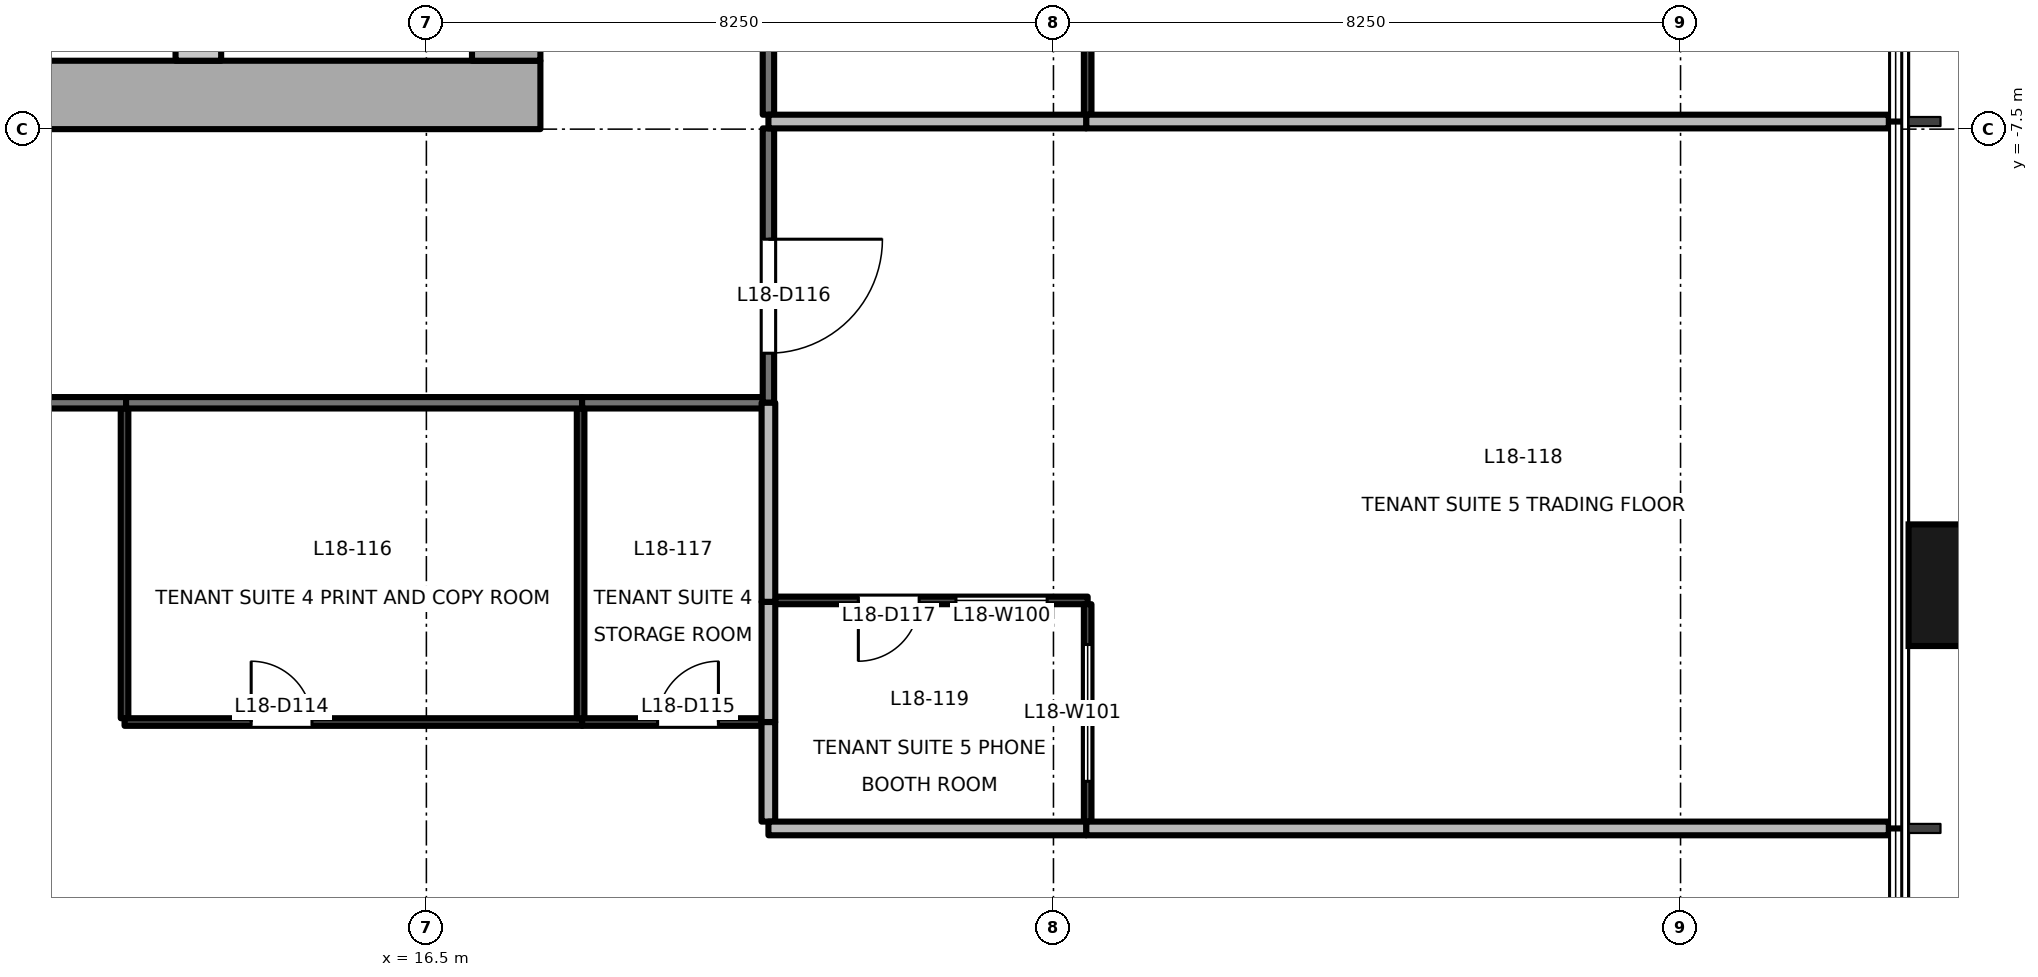
"""IFC4 building model, lengths in metres.
Left out: names, types, materials, properties, quantities, classifications, styles, units other than length and angle.
Written with IfcOpenShell. Run it as: python <this file> out.ifc"""

import sys

from ifc_helpers import new_model, si_unit, direction, frame, frame_2d, origin, origin_2d, place, context, subcontext, project, spatial, rectangle, extrude, element, fill, save


model = new_model("IFC4")
c1 = context("Model", 3, precision=1e-05, world=origin(), true_north=direction((0.0, 1.0)))
c2 = subcontext(c1, "Body", "Model", "MODEL_VIEW")
j1 = project(units=[si_unit("LENGTHUNIT", "METRE"), si_unit("PLANEANGLEUNIT", "RADIAN")], contexts=[c1])
p1 = place(None, origin())
s1 = spatial("IfcSite", under=j1, at=p1, CompositionType="ELEMENT")
p2 = place(p1, origin())
s2 = spatial("IfcBuilding", under=s1, at=p2, CompositionType="ELEMENT")
p3 = place(p2, frame((0.0, 0.0, 83.7)))
s3 = spatial("IfcBuildingStorey", under=s2, at=p3, CompositionType="ELEMENT", Elevation=83.7)
p4 = place(p3, frame((36.9, -13.5, -0.2), z_axis=(0.0, 0.0, 1.0), x_axis=(0.0, 1.0, 0.0)))
e1 = element("IfcColumn", 1, at=p4, inside=s3, PredefinedType="COLUMN", context=c2, shape_type="SweptSolid", body=[
    extrude(rectangle(XDim=1.6, YDim=1.8, at=origin_2d()), origin(), (0.0, 0.0, 1.0), 4.0),
])
p5 = place(p3, frame((-18.0, -7.05, -0.2), z_axis=(0.0, 0.0, 1.0), x_axis=(1.0, 0.0, 0.0)))
e2 = element("IfcWall", 2, at=p5, inside=s3, PredefinedType="SHEAR", context=c2, shape_type="SweptSolid", body=[
    extrude(rectangle(XDim=36.0, YDim=0.9, at=frame_2d((18.0, 0.0))), origin(), (0.0, 0.0, 1.0), 4.0),
])
p6 = place(p5, frame((7.8, 0.0, 0.2)))
e3 = element("IfcOpeningElement", 3, at=p6, cuts=e2, PredefinedType="OPENING", context=c2, shape_type="SweptSolid", body=[
    extrude(rectangle(XDim=2.4, YDim=2.1, at=frame_2d((1.2, 1.05))), frame((0.0, 0.46, 0.0), z_axis=(0.0, -1.0, 0.0), x_axis=(1.0, 0.0, 0.0)), (0.0, 0.0, 1.0), 0.921),
])
p7 = place(p5, frame((17.4, 0.0, 0.2)))
e4 = element("IfcOpeningElement", 4, at=p7, cuts=e2, PredefinedType="OPENING", context=c2, shape_type="SweptSolid", body=[
    extrude(rectangle(XDim=1.2, YDim=2.1, at=frame_2d((0.6, 1.05))), frame((0.0, 0.46, 0.0), z_axis=(0.0, -1.0, 0.0), x_axis=(1.0, 0.0, 0.0)), (0.0, 0.0, 1.0), 0.921),
])
p8 = place(p5, frame((26.1, 0.0, 0.2)))
e5 = element("IfcOpeningElement", 5, at=p8, cuts=e2, PredefinedType="OPENING", context=c2, shape_type="SweptSolid", body=[
    extrude(rectangle(XDim=2.4, YDim=2.1, at=frame_2d((1.2, 1.05))), frame((0.0, 0.46, 0.0), z_axis=(0.0, -1.0, 0.0), x_axis=(1.0, 0.0, 0.0)), (0.0, 0.0, 1.0), 0.921),
])
p9 = place(p3, frame((17.55, -6.6, -0.2), z_axis=(0.0, 0.0, 1.0), x_axis=(0.0, 1.0, 0.0)))
e6 = element("IfcWall", 6, at=p9, inside=s3, PredefinedType="SHEAR", context=c2, shape_type="SweptSolid", body=[
    extrude(rectangle(XDim=13.2, YDim=0.9, at=frame_2d((6.6, 0.0))), origin(), (0.0, 0.0, 1.0), 4.0),
])
p10 = place(p9, frame((4.55, 0.0, 0.2)))
e7 = element("IfcOpeningElement", 7, at=p10, cuts=e6, PredefinedType="OPENING", context=c2, shape_type="SweptSolid", body=[
    extrude(rectangle(XDim=1.2, YDim=2.1, at=frame_2d((0.6, 1.05))), frame((0.0, 0.46, 0.0), z_axis=(0.0, -1.0, 0.0), x_axis=(1.0, 0.0, 0.0)), (0.0, 0.0, 1.0), 0.921),
])
p11 = place(p3, frame((13.5, -6.6, -0.2), z_axis=(0.0, 0.0, 1.0), x_axis=(0.0, 1.0, 0.0)))
e8 = element("IfcWall", 8, at=p11, inside=s3, PredefinedType="SHEAR", context=c2, shape_type="SweptSolid", body=[
    extrude(rectangle(XDim=13.2, YDim=0.6, at=frame_2d((6.6, 0.0))), origin(), (0.0, 0.0, 1.0), 4.0),
])
p12 = place(p3, frame((12.549, -11.1, 0.0), z_axis=(0.0, 0.0, 1.0), x_axis=(-1.0, 0.0, 0.0)))
e9 = element("IfcWall", 9, at=p12, inside=s3, PredefinedType="PARTITIONING", context=c2, shape_type="SweptSolid", body=[
    extrude(rectangle(XDim=6.04, YDim=0.15, at=frame_2d((3.02, 0.0))), origin(), (0.0, 0.0, 1.0), 2.8),
])
p13 = place(p12, frame((2.12, 0.0, 0.0)))
e10 = element("IfcOpeningElement", 10, at=p13, cuts=e9, PredefinedType="OPENING", context=c2, shape_type="SweptSolid", body=[
    extrude(rectangle(XDim=1.8, YDim=2.1, at=frame_2d((0.9, 1.05))), frame((0.0, 0.085, 0.0), z_axis=(0.0, -1.0, 0.0), x_axis=(1.0, 0.0, 0.0)), (0.0, 0.0, 1.0), 0.171),
])
p14 = place(p3, frame((18.549, -11.1, 0.0), z_axis=(0.0, 0.0, 1.0), x_axis=(-1.0, 0.0, 0.0)))
e11 = element("IfcWall", 11, at=p14, inside=s3, PredefinedType="PARTITIONING", context=c2, shape_type="SweptSolid", body=[
    extrude(rectangle(XDim=6.0, YDim=0.15, at=frame_2d((3.0, 0.0))), origin(), (0.0, 0.0, 1.0), 2.4),
])
p15 = place(p3, frame((20.925, -11.1, 0.0), z_axis=(0.0, 0.0, 1.0), x_axis=(-1.0, 0.0, 0.0)))
e12 = element("IfcWall", 12, at=p15, inside=s3, PredefinedType="PARTITIONING", context=c2, shape_type="SweptSolid", body=[
    extrude(rectangle(XDim=2.376, YDim=0.15, at=frame_2d((1.188, 0.0))), origin(), (0.0, 0.0, 1.0), 3.8),
])
p16 = place(p3, frame((21.0, -7.49, 0.0), z_axis=(0.0, 0.0, 1.0), x_axis=(0.0, -1.0, 0.0)))
e13 = element("IfcWall", 13, at=p16, inside=s3, PredefinedType="PARTITIONING", context=c2, shape_type="SweptSolid", body=[
    extrude(rectangle(XDim=3.61, YDim=0.15, at=frame_2d((1.805, 0.0))), origin(), (0.0, 0.0, 1.0), 2.9),
])
p17 = place(p16, frame((1.458, 0.0, 0.0)))
e14 = element("IfcOpeningElement", 14, at=p17, cuts=e13, PredefinedType="OPENING", context=c2, shape_type="SweptSolid", body=[
    extrude(rectangle(XDim=1.5, YDim=2.1, at=frame_2d((0.75, 1.05))), frame((0.0, 0.085, 0.0), z_axis=(0.0, -1.0, 0.0), x_axis=(1.0, 0.0, 0.0)), (0.0, 0.0, 1.0), 0.171),
])
p18 = place(p3, frame((21.0, -1.38, 0.0), z_axis=(0.0, 0.0, 1.0), x_axis=(0.0, -1.0, 0.0)))
e15 = element("IfcWall", 15, at=p18, inside=s3, PredefinedType="PARTITIONING", context=c2, shape_type="SweptSolid", body=[
    extrude(rectangle(XDim=5.93, YDim=0.15, at=frame_2d((2.965, 0.0))), origin(), (0.0, 0.0, 1.0), 2.9),
])
p19 = place(p3, frame((12.529, -11.175, 0.0), z_axis=(0.0, 0.0, 1.0), x_axis=(0.0, -1.0, 0.0)))
e16 = element("IfcWall", 16, at=p19, inside=s3, PredefinedType="PARTITIONING", context=c2, shape_type="SweptSolid", body=[
    extrude(rectangle(XDim=4.075, YDim=0.1, at=frame_2d((2.038, 0.0))), origin(), (0.0, 0.0, 1.0), 3.8),
])
p20 = place(p3, frame((12.529, -15.3, 0.0), z_axis=(0.0, 0.0, 1.0), x_axis=(1.0, 0.0, 0.0)))
e17 = element("IfcWall", 17, at=p20, inside=s3, PredefinedType="PARTITIONING", context=c2, shape_type="SweptSolid", body=[
    extrude(rectangle(XDim=6.02, YDim=0.1, at=frame_2d((3.01, 0.0))), origin(), (0.0, 0.0, 1.0), 2.4),
])
p21 = place(p20, frame((1.666, 0.0, 0.0)))
e18 = element("IfcOpeningElement", 18, at=p21, cuts=e17, PredefinedType="OPENING", context=c2, shape_type="SweptSolid", body=[
    extrude(rectangle(XDim=0.8, YDim=2.1, at=frame_2d((0.4, 1.05))), frame((0.0, 0.061, 0.0), z_axis=(0.0, -1.0, 0.0), x_axis=(1.0, 0.0, 0.0)), (0.0, 0.0, 1.0), 0.121),
])
p22 = place(p3, frame((18.549, -15.3, 0.0), z_axis=(0.0, 0.0, 1.0), x_axis=(1.0, 0.0, 0.0)))
e19 = element("IfcWall", 19, at=p22, inside=s3, PredefinedType="PARTITIONING", context=c2, shape_type="SweptSolid", body=[
    extrude(rectangle(XDim=2.361, YDim=0.1, at=frame_2d((1.18, 0.0))), origin(), (0.0, 0.0, 1.0), 3.8),
])
p23 = place(p22, frame((0.993, 0.0, 0.0)))
e20 = element("IfcOpeningElement", 20, at=p23, cuts=e19, PredefinedType="OPENING", context=c2, shape_type="SweptSolid", body=[
    extrude(rectangle(XDim=0.8, YDim=2.1, at=frame_2d((0.4, 1.05))), frame((0.0, 0.061, 0.0), z_axis=(0.0, -1.0, 0.0), x_axis=(1.0, 0.0, 0.0)), (0.0, 0.0, 1.0), 0.121),
])
p24 = place(p3, frame((25.18, -16.7, 0.0), z_axis=(0.0, 0.0, 1.0), x_axis=(1.0, 0.0, 0.0)))
e21 = element("IfcWall", 21, at=p24, inside=s3, PredefinedType="PARTITIONING", context=c2, shape_type="SweptSolid", body=[
    extrude(rectangle(XDim=10.56, YDim=0.18, at=frame_2d((5.28, 0.0))), origin(), (0.0, 0.0, 1.0), 3.8),
])
p25 = place(p3, frame((20.999, -15.3, 0.0), z_axis=(0.0, 0.0, 1.0), x_axis=(0.0, -1.0, 0.0)))
e22 = element("IfcWall", 22, at=p25, inside=s3, PredefinedType="PARTITIONING", context=c2, shape_type="SweptSolid", body=[
    extrude(rectangle(XDim=1.31, YDim=0.18, at=frame_2d((0.655, 0.0))), origin(), (0.0, 0.0, 1.0), 3.8),
])
p26 = place(p3, frame((21.0, -16.7, 0.0), z_axis=(0.0, 0.0, 1.0), x_axis=(1.0, 0.0, 0.0)))
e23 = element("IfcWall", 23, at=p26, inside=s3, PredefinedType="PARTITIONING", context=c2, shape_type="SweptSolid", body=[
    extrude(rectangle(XDim=4.18, YDim=0.18, at=frame_2d((2.09, 0.0))), origin(), (0.0, 0.0, 1.0), 3.8),
])
p27 = place(p3, frame((18.529, -11.175, 0.0), z_axis=(0.0, 0.0, 1.0), x_axis=(0.0, -1.0, 0.0)))
e24 = element("IfcWall", 24, at=p27, inside=s3, PredefinedType="PARTITIONING", context=c2, shape_type="SweptSolid", body=[
    extrude(rectangle(XDim=4.075, YDim=0.1, at=frame_2d((2.038, 0.0))), origin(), (0.0, 0.0, 1.0), 2.9),
])
p28 = place(p3, frame((21.0, -11.1, 0.0), z_axis=(0.0, 0.0, 1.0), x_axis=(0.0, -1.0, 0.0)))
e25 = element("IfcWall", 25, at=p28, inside=s3, PredefinedType="PARTITIONING", context=c2, shape_type="SweptSolid", body=[
    extrude(rectangle(XDim=2.62, YDim=0.18, at=frame_2d((1.31, 0.0))), origin(), (0.0, 0.0, 1.0), 2.9),
])
p29 = place(p3, frame((21.0, -13.72, 0.0), z_axis=(0.0, 0.0, 1.0), x_axis=(0.0, -1.0, 0.0)))
e26 = element("IfcWall", 26, at=p29, inside=s3, PredefinedType="PARTITIONING", context=c2, shape_type="SweptSolid", body=[
    extrude(rectangle(XDim=1.58, YDim=0.18, at=frame_2d((0.79, 0.0))), origin(), (0.0, 0.0, 1.0), 3.8),
])
p30 = place(p3, frame((25.2, -13.7, 0.0), z_axis=(0.0, 0.0, 1.0), x_axis=(-1.0, 0.0, 0.0)))
e27 = element("IfcWall", 27, at=p30, inside=s3, PredefinedType="PARTITIONING", context=c2, shape_type="SweptSolid", body=[
    extrude(rectangle(XDim=4.11, YDim=0.1, at=frame_2d((2.055, 0.0))), origin(), (0.0, 0.0, 1.0), 3.8),
])
p31 = place(p30, frame((2.217, 0.0, 0.0)))
e28 = element("IfcOpeningElement", 28, at=p31, cuts=e27, PredefinedType="OPENING", context=c2, shape_type="SweptSolid", body=[
    extrude(rectangle(XDim=0.8, YDim=2.1, at=frame_2d((0.4, 1.05))), frame((0.0, 0.061, 0.0), z_axis=(0.0, -1.0, 0.0), x_axis=(1.0, 0.0, 0.0)), (0.0, 0.0, 1.0), 0.121),
])
p32 = place(p30, frame((0.533, 0.0, 0.9)))
e29 = element("IfcOpeningElement", 29, at=p32, cuts=e27, PredefinedType="OPENING", context=c2, shape_type="SweptSolid", body=[
    extrude(rectangle(XDim=1.2, YDim=1.2, at=frame_2d((0.6, 0.6))), frame((0.0, 0.061, 0.0), z_axis=(0.0, -1.0, 0.0), x_axis=(1.0, 0.0, 0.0)), (0.0, 0.0, 1.0), 0.121),
])
p33 = place(p3, frame((25.2, -16.61, 0.0), z_axis=(0.0, 0.0, 1.0), x_axis=(0.0, 1.0, 0.0)))
e30 = element("IfcWall", 30, at=p33, inside=s3, PredefinedType="PARTITIONING", context=c2, shape_type="SweptSolid", body=[
    extrude(rectangle(XDim=2.86, YDim=0.1, at=frame_2d((1.43, 0.0))), origin(), (0.0, 0.0, 1.0), 3.8),
])
p34 = place(p33, frame((0.53, 0.0, 0.9)))
e31 = element("IfcOpeningElement", 31, at=p34, cuts=e30, PredefinedType="OPENING", context=c2, shape_type="SweptSolid", body=[
    extrude(rectangle(XDim=1.8, YDim=1.2, at=frame_2d((0.9, 0.6))), frame((0.0, 0.061, 0.0), z_axis=(0.0, -1.0, 0.0), x_axis=(1.0, 0.0, 0.0)), (0.0, 0.0, 1.0), 0.121),
])
p35 = place(p3, frame((25.18, -7.4, 0.0), z_axis=(0.0, 0.0, 1.0), x_axis=(1.0, 0.0, 0.0)))
e32 = element("IfcWall", 32, at=p35, inside=s3, PredefinedType="PARTITIONING", context=c2, shape_type="SweptSolid", body=[
    extrude(rectangle(XDim=10.56, YDim=0.18, at=frame_2d((5.28, 0.0))), origin(), (0.0, 0.0, 1.0), 3.8),
])
p36 = place(p3, frame((21.0, -7.4, 0.0), z_axis=(0.0, 0.0, 1.0), x_axis=(1.0, 0.0, 0.0)))
e33 = element("IfcWall", 33, at=p36, inside=s3, PredefinedType="PARTITIONING", context=c2, shape_type="SweptSolid", body=[
    extrude(rectangle(XDim=4.18, YDim=0.18, at=frame_2d((2.09, 0.0))), origin(), (0.0, 0.0, 1.0), 3.8),
])
p37 = place(p3, frame((25.2, -7.31, 0.0), z_axis=(0.0, 0.0, 1.0), x_axis=(0.0, 1.0, 0.0)))
e34 = element("IfcWall", 34, at=p37, inside=s3, PredefinedType="PARTITIONING", context=c2, shape_type="SweptSolid", body=[
    extrude(rectangle(XDim=5.91, YDim=0.1, at=frame_2d((2.955, 0.0))), origin(), (0.0, 0.0, 1.0), 2.9),
])
p38 = place(p37, frame((2.555, 0.0, 0.0)))
e35 = element("IfcOpeningElement", 35, at=p38, cuts=e34, PredefinedType="OPENING", context=c2, shape_type="SweptSolid", body=[
    extrude(rectangle(XDim=0.8, YDim=2.1, at=frame_2d((0.4, 1.05))), frame((0.0, 0.061, 0.0), z_axis=(0.0, -1.0, 0.0), x_axis=(1.0, 0.0, 0.0)), (0.0, 0.0, 1.0), 0.121),
])
p39 = place(p21, origin())
e36 = element("IfcDoor", 36, at=p39, inside=s3, OperationType="SINGLE_SWING_LEFT", PredefinedType="DOOR", context=c2, shape_type="SweptSolid", body=[
    extrude(rectangle(XDim=0.8, YDim=2.1, at=frame_2d((0.4, 1.05))), frame((0.0, 0.025, 0.0), z_axis=(0.0, -1.0, 0.0), x_axis=(1.0, 0.0, 0.0)), (0.0, 0.0, 1.0), 0.05),
])
fill(e18, e36)
p40 = place(p23, origin())
e37 = element("IfcDoor", 37, at=p40, inside=s3, OperationType="SINGLE_SWING_RIGHT", PredefinedType="DOOR", context=c2, shape_type="SweptSolid", body=[
    extrude(rectangle(XDim=0.8, YDim=2.1, at=frame_2d((0.4, 1.05))), frame((0.0, 0.025, 0.0), z_axis=(0.0, -1.0, 0.0), x_axis=(1.0, 0.0, 0.0)), (0.0, 0.0, 1.0), 0.05),
])
fill(e20, e37)
p41 = place(p17, origin())
e38 = element("IfcDoor", 38, at=p41, inside=s3, OperationType="DOUBLE_DOOR_SINGLE_SWING", PredefinedType="DOOR", context=c2, shape_type="SweptSolid", body=[
    extrude(rectangle(XDim=1.5, YDim=2.1, at=frame_2d((0.75, 1.05))), frame((0.0, 0.025, 0.0), z_axis=(0.0, -1.0, 0.0), x_axis=(1.0, 0.0, 0.0)), (0.0, 0.0, 1.0), 0.05),
])
fill(e14, e38)
p42 = place(p31, origin())
e39 = element("IfcDoor", 39, at=p42, inside=s3, OperationType="SINGLE_SWING_RIGHT", PredefinedType="DOOR", context=c2, shape_type="SweptSolid", body=[
    extrude(rectangle(XDim=0.8, YDim=2.1, at=frame_2d((0.4, 1.05))), frame((0.0, 0.025, 0.0), z_axis=(0.0, -1.0, 0.0), x_axis=(1.0, 0.0, 0.0)), (0.0, 0.0, 1.0), 0.05),
])
fill(e28, e39)
p43 = place(p32, origin())
e40 = element("IfcWindow", 40, at=p43, inside=s3, PartitioningType="SINGLE_PANEL", PredefinedType="WINDOW", context=c2, shape_type="SweptSolid", body=[
    extrude(rectangle(XDim=1.2, YDim=1.2, at=frame_2d((0.6, 0.6))), frame((0.0, 0.03, 0.0), z_axis=(0.0, -1.0, 0.0), x_axis=(1.0, 0.0, 0.0)), (0.0, 0.0, 1.0), 0.06),
])
fill(e29, e40)
p44 = place(p34, origin())
e41 = element("IfcWindow", 41, at=p44, inside=s3, PartitioningType="SINGLE_PANEL", PredefinedType="WINDOW", context=c2, shape_type="SweptSolid", body=[
    extrude(rectangle(XDim=1.8, YDim=1.2, at=frame_2d((0.9, 0.6))), frame((0.0, 0.03, 0.0), z_axis=(0.0, -1.0, 0.0), x_axis=(1.0, 0.0, 0.0)), (0.0, 0.0, 1.0), 0.06),
])
fill(e31, e41)
save(model, sys.argv[1])
